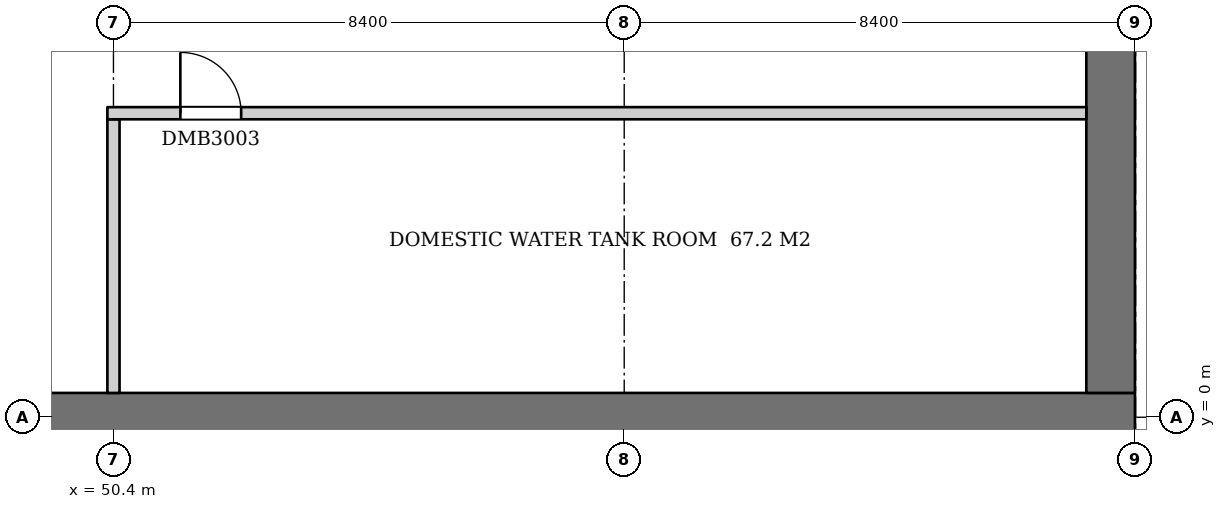
"""IFC4 building model, lengths in metres.
Left out: names, types, materials, properties, quantities, classifications, styles, units other than length and angle.
Written with IfcOpenShell. Run it as: python <this file> out.ifc"""

import sys

from ifc_helpers import new_model, si_unit, direction, frame, frame_2d, origin, place, context, subcontext, project, spatial, rectangle, extrude, element, fill, save


model = new_model("IFC4")
c1 = context("Model", 3, precision=1e-05, world=origin(), true_north=direction((0.0, 1.0)))
c2 = subcontext(c1, "Body", "Model", "MODEL_VIEW")
j1 = project(units=[si_unit("LENGTHUNIT", "METRE"), si_unit("PLANEANGLEUNIT", "RADIAN")], contexts=[c1])
p1 = place(None, origin())
s1 = spatial("IfcSite", under=j1, at=p1, CompositionType="ELEMENT")
p2 = place(p1, origin())
s2 = spatial("IfcBuilding", under=s1, at=p2, CompositionType="ELEMENT")
p3 = place(p2, frame((0.0, 0.0, -12.0)))
s3 = spatial("IfcBuildingStorey", under=s2, at=p3, CompositionType="ELEMENT", Elevation=-12.0)
p4 = place(p3, frame((-0.4, 0.0, 0.0), z_axis=(0.0, 0.0, 1.0), x_axis=(1.0, 0.0, 0.0)))
e1 = element("IfcWall", 1, at=p4, inside=s3, PredefinedType="SOLIDWALL", context=c2, shape_type="SweptSolid", body=[
    extrude(rectangle(XDim=67.6, YDim=0.8, at=frame_2d((33.8, 0.0))), origin(), (0.0, 0.0, 1.0), 3.7),
])
p5 = place(p3, frame((66.8, 0.4, 0.0), z_axis=(0.0, 0.0, 1.0), x_axis=(0.0, 1.0, 0.0)))
e2 = element("IfcWall", 2, at=p5, inside=s3, PredefinedType="SOLIDWALL", context=c2, shape_type="SweptSolid", body=[
    extrude(rectangle(XDim=58.0, YDim=0.8, at=frame_2d((29.0, 0.0))), origin(), (0.0, 0.0, 1.0), 3.7),
])
p6 = place(p3, frame((50.4, 0.4, 0.0), z_axis=(0.0, 0.0, 1.0), x_axis=(0.0, 1.0, 0.0)))
e3 = element("IfcWall", 3, at=p6, inside=s3, PredefinedType="PARTITIONING", context=c2, shape_type="SweptSolid", body=[
    extrude(rectangle(XDim=4.5, YDim=0.2, at=frame_2d((2.25, 0.0))), origin(), (0.0, 0.0, 1.0), 3.7),
])
p7 = place(p3, frame((50.3, 5.0, 0.0), z_axis=(0.0, 0.0, 1.0), x_axis=(1.0, 0.0, 0.0)))
e4 = element("IfcWall", 4, at=p7, inside=s3, PredefinedType="PARTITIONING", context=c2, shape_type="SweptSolid", body=[
    extrude(rectangle(XDim=16.1, YDim=0.2, at=frame_2d((8.05, 0.0))), origin(), (0.0, 0.0, 1.0), 3.7),
])
p8 = place(p7, frame((1.2, 0.0, 0.0)))
e5 = element("IfcOpeningElement", 5, at=p8, cuts=e4, PredefinedType="OPENING", context=c2, shape_type="SweptSolid", body=[
    extrude(rectangle(XDim=1.0, YDim=2.1, at=frame_2d((0.5, 1.05))), frame((0.0, 0.11, 0.0), z_axis=(0.0, -1.0, 0.0), x_axis=(1.0, 0.0, 0.0)), (0.0, 0.0, 1.0), 0.22),
])
p9 = place(p8, origin())
e6 = element("IfcDoor", 6, at=p9, inside=s3, OperationType="SINGLE_SWING_LEFT", PredefinedType="DOOR", context=c2, shape_type="SweptSolid", body=[
    extrude(rectangle(XDim=1.0, YDim=2.1, at=frame_2d((0.5, 1.05))), frame((0.0, 0.025, 0.0), z_axis=(0.0, -1.0, 0.0), x_axis=(1.0, 0.0, 0.0)), (0.0, 0.0, 1.0), 0.05),
])
fill(e5, e6)
save(model, sys.argv[1])
